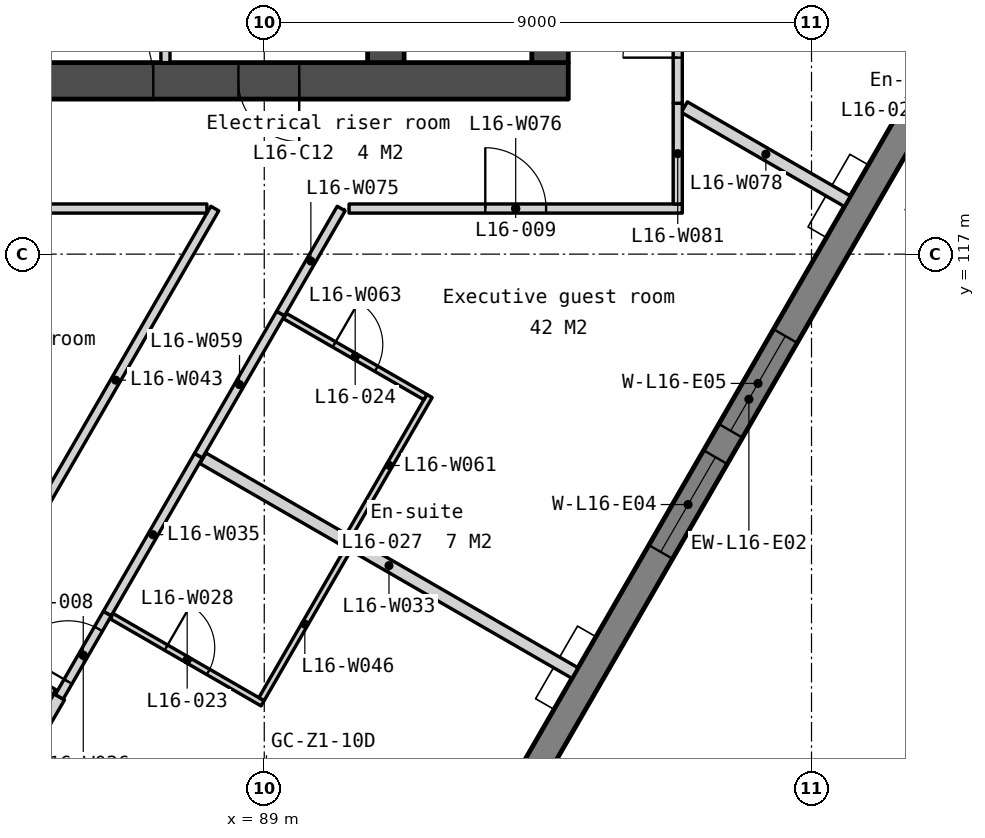
"""IFC4 building model, lengths in metres.
Left out: names, types, materials, properties, quantities, classifications, styles, units other than length and angle.
Written with IfcOpenShell. Run it as: python <this file> out.ifc"""

import sys

from ifc_helpers import new_model, si_unit, direction, frame, frame_2d, origin, place, context, subcontext, project, spatial, polyline, rectangle, outline, extrude, element, fill, save


model = new_model("IFC4")
c1 = context("Model", 3, precision=1e-05, world=origin(), true_north=direction((0.0, 1.0)))
c2 = subcontext(c1, "Body", "Model", "MODEL_VIEW")
j1 = project(units=[si_unit("LENGTHUNIT", "METRE"), si_unit("PLANEANGLEUNIT", "RADIAN")], contexts=[c1])
p1 = place(None, origin())
s1 = spatial("IfcSite", under=j1, at=p1, CompositionType="ELEMENT")
p2 = place(p1, origin())
s2 = spatial("IfcBuilding", under=s1, at=p2, CompositionType="ELEMENT")
p3 = place(p2, frame((0.0, 0.0, 70.0)))
s3 = spatial("IfcBuildingStorey", under=s2, at=p3, CompositionType="ELEMENT", Elevation=70.0)
p4 = place(p3, frame((66.0, 119.85, 0.0), z_axis=(0.0, 0.0, 1.0), x_axis=(1.0, 0.0, 0.0)))
e1 = element("IfcWall", 1, at=p4, inside=s3, PredefinedType="SOLIDWALL", context=c2, shape_type="SweptSolid", body=[
    extrude(rectangle(XDim=28.0, YDim=0.6, at=frame_2d((14.0, 0.0))), origin(), (0.0, 0.0, 1.0), 3.35),
])
p5 = place(p4, frame((6.825, 0.0, 0.0)))
e2 = element("IfcOpeningElement", 2, at=p5, cuts=e1, PredefinedType="OPENING", context=c2, shape_type="SweptSolid", body=[
    extrude(rectangle(XDim=1.8, YDim=2.1, at=frame_2d((0.9, 1.05))), frame((0.0, 0.31, 0.0), z_axis=(0.0, -1.0, 0.0), x_axis=(1.0, 0.0, 0.0)), (0.0, 0.0, 1.0), 0.62),
])
p6 = place(p4, frame((15.85, 0.0, 0.0)))
e3 = element("IfcOpeningElement", 3, at=p6, cuts=e1, PredefinedType="OPENING", context=c2, shape_type="SweptSolid", body=[
    extrude(rectangle(XDim=1.5, YDim=2.1, at=frame_2d((0.75, 1.05))), frame((0.0, 0.31, 0.0), z_axis=(0.0, -1.0, 0.0), x_axis=(1.0, 0.0, 0.0)), (0.0, 0.0, 1.0), 0.62),
])
p7 = place(p4, frame((19.375, 0.0, 0.0)))
e4 = element("IfcOpeningElement", 4, at=p7, cuts=e1, PredefinedType="OPENING", context=c2, shape_type="SweptSolid", body=[
    extrude(rectangle(XDim=1.8, YDim=2.1, at=frame_2d((0.9, 1.05))), frame((0.0, 0.31, 0.0), z_axis=(0.0, -1.0, 0.0), x_axis=(1.0, 0.0, 0.0)), (0.0, 0.0, 1.0), 0.62),
])
p8 = place(p4, frame((4.425, 0.0, 0.0)))
e5 = element("IfcOpeningElement", 5, at=p8, cuts=e1, PredefinedType="OPENING", context=c2, shape_type="SweptSolid", body=[
    extrude(rectangle(XDim=1.0, YDim=2.1, at=frame_2d((0.5, 1.05))), frame((0.0, 0.31, 0.0), z_axis=(0.0, -1.0, 0.0), x_axis=(1.0, 0.0, 0.0)), (0.0, 0.0, 1.0), 0.62),
])
p9 = place(p4, frame((9.783, 0.0, 0.0)))
e6 = element("IfcOpeningElement", 6, at=p9, cuts=e1, PredefinedType="OPENING", context=c2, shape_type="SweptSolid", body=[
    extrude(rectangle(XDim=1.0, YDim=2.1, at=frame_2d((0.5, 1.05))), frame((0.0, 0.31, 0.0), z_axis=(0.0, -1.0, 0.0), x_axis=(1.0, 0.0, 0.0)), (0.0, 0.0, 1.0), 0.62),
])
p10 = place(p4, frame((11.525, 0.0, 0.0)))
e7 = element("IfcOpeningElement", 7, at=p10, cuts=e1, PredefinedType="OPENING", context=c2, shape_type="SweptSolid", body=[
    extrude(rectangle(XDim=1.0, YDim=2.1, at=frame_2d((0.5, 1.05))), frame((0.0, 0.31, 0.0), z_axis=(0.0, -1.0, 0.0), x_axis=(1.0, 0.0, 0.0)), (0.0, 0.0, 1.0), 0.62),
])
p11 = place(p4, frame((13.658, 0.0, 0.0)))
e8 = element("IfcOpeningElement", 8, at=p11, cuts=e1, PredefinedType="OPENING", context=c2, shape_type="SweptSolid", body=[
    extrude(rectangle(XDim=1.0, YDim=2.1, at=frame_2d((0.5, 1.05))), frame((0.0, 0.31, 0.0), z_axis=(0.0, -1.0, 0.0), x_axis=(1.0, 0.0, 0.0)), (0.0, 0.0, 1.0), 0.62),
])
p12 = place(p4, frame((22.575, 0.0, 0.0)))
e9 = element("IfcOpeningElement", 9, at=p12, cuts=e1, PredefinedType="OPENING", context=c2, shape_type="SweptSolid", body=[
    extrude(rectangle(XDim=1.0, YDim=2.1, at=frame_2d((0.5, 1.05))), frame((0.0, 0.31, 0.0), z_axis=(0.0, -1.0, 0.0), x_axis=(1.0, 0.0, 0.0)), (0.0, 0.0, 1.0), 0.62),
])
p13 = place(p3, frame((87.375, 122.25, 0.0), z_axis=(0.0, 0.0, 1.0), x_axis=(0.0, -1.0, 0.0)))
e10 = element("IfcWall", 10, at=p13, inside=s3, PredefinedType="PARTITIONING", context=c2, shape_type="SweptSolid", body=[
    extrude(rectangle(XDim=2.1, YDim=0.15, at=frame_2d((1.05, 0.0))), origin(), (0.0, 0.0, 1.0), 3.35),
])
p14 = place(p3, frame((91.0, 122.25, 0.0), z_axis=(0.0, 0.0, 1.0), x_axis=(0.0, -1.0, 0.0)))
e11 = element("IfcWall", 11, at=p14, inside=s3, PredefinedType="SOLIDWALL", context=c2, shape_type="SweptSolid", body=[
    extrude(rectangle(XDim=2.1, YDim=0.6, at=frame_2d((1.05, 0.0))), origin(), (0.0, 0.0, 1.0), 3.35),
])
p15 = place(p3, frame((93.7, 133.95, 0.0), z_axis=(0.0, 0.0, 1.0), x_axis=(0.0, -1.0, 0.0)))
e12 = element("IfcWall", 12, at=p15, inside=s3, PredefinedType="SOLIDWALL", context=c2, shape_type="SweptSolid", body=[
    extrude(rectangle(XDim=13.8, YDim=0.6, at=frame_2d((6.9, 0.0))), origin(), (0.0, 0.0, 1.0), 3.35),
])
p16 = place(p15, frame((0.6, 0.0, 0.0)))
e13 = element("IfcOpeningElement", 13, at=p16, cuts=e12, PredefinedType="OPENING", context=c2, shape_type="SweptSolid", body=[
    extrude(rectangle(XDim=1.1, YDim=2.1, at=frame_2d((0.55, 1.05))), frame((0.0, 0.31, 0.0), z_axis=(0.0, -1.0, 0.0), x_axis=(1.0, 0.0, 0.0)), (0.0, 0.0, 1.0), 0.62),
])
p17 = place(p15, frame((8.35, 0.0, 0.0)))
e14 = element("IfcOpeningElement", 14, at=p17, cuts=e12, PredefinedType="OPENING", context=c2, shape_type="SweptSolid", body=[
    extrude(rectangle(XDim=0.826, YDim=2.1, at=frame_2d((0.413, 1.05))), frame((0.0, 0.31, 0.0), z_axis=(0.0, -1.0, 0.0), x_axis=(1.0, 0.0, 0.0)), (0.0, 0.0, 1.0), 0.62),
])
p18 = place(p15, frame((10.071, 0.0, 0.0)))
e15 = element("IfcOpeningElement", 15, at=p18, cuts=e12, PredefinedType="OPENING", context=c2, shape_type="SweptSolid", body=[
    extrude(rectangle(XDim=1.0, YDim=2.1, at=frame_2d((0.5, 1.05))), frame((0.0, 0.31, 0.0), z_axis=(0.0, -1.0, 0.0), x_axis=(1.0, 0.0, 0.0)), (0.0, 0.0, 1.0), 0.62),
])
p19 = place(p15, frame((12.258, 0.0, 0.0)))
e16 = element("IfcOpeningElement", 16, at=p19, cuts=e12, PredefinedType="OPENING", context=c2, shape_type="SweptSolid", body=[
    extrude(rectangle(XDim=1.0, YDim=2.1, at=frame_2d((0.5, 1.05))), frame((0.0, 0.31, 0.0), z_axis=(0.0, -1.0, 0.0), x_axis=(1.0, 0.0, 0.0)), (0.0, 0.0, 1.0), 0.62),
])
p20 = place(p3, frame((88.435, 99.831, -0.15), z_axis=(0.0, 0.0, 1.0), x_axis=(0.500000806382, 0.866024938219, 0.0)))
e17 = element("IfcWall", 17, at=p20, inside=s3, PredefinedType="SOLIDWALL", context=c2, shape_type="SweptSolid", body=[
    extrude(outline(polyline([(34.14, 3.5), (34.14, 0.0), (0.0, 0.0), (0.0, 3.5), (34.14, 3.5)])), frame((0.0, 0.225, 0.0), z_axis=(0.0, -1.0, 0.0), x_axis=(1.0, 0.0, 0.0)), (0.0, 0.0, 1.0), 0.45),
])
p21 = place(p20, frame((5.21, 0.0, 1.05)))
e18 = element("IfcOpeningElement", 18, at=p21, cuts=e17, PredefinedType="OPENING", context=c2, shape_type="SweptSolid", body=[
    extrude(rectangle(XDim=1.8, YDim=1.5, at=frame_2d((0.9, 0.75))), frame((0.0, 0.235, 0.0), z_axis=(0.0, -1.0, 0.0), x_axis=(1.0, 0.0, 0.0)), (0.0, 0.0, 1.0), 0.47),
])
p22 = place(p20, frame((7.51, 0.0, 1.05)))
e19 = element("IfcOpeningElement", 19, at=p22, cuts=e17, PredefinedType="OPENING", context=c2, shape_type="SweptSolid", body=[
    extrude(rectangle(XDim=1.8, YDim=1.5, at=frame_2d((0.9, 0.75))), frame((0.0, 0.235, 0.0), z_axis=(0.0, -1.0, 0.0), x_axis=(1.0, 0.0, 0.0)), (0.0, 0.0, 1.0), 0.47),
])
p23 = place(p20, frame((14.17, 0.0, 1.05)))
e20 = element("IfcOpeningElement", 20, at=p23, cuts=e17, PredefinedType="OPENING", context=c2, shape_type="SweptSolid", body=[
    extrude(rectangle(XDim=1.8, YDim=1.5, at=frame_2d((0.9, 0.75))), frame((0.0, 0.235, 0.0), z_axis=(0.0, -1.0, 0.0), x_axis=(1.0, 0.0, 0.0)), (0.0, 0.0, 1.0), 0.47),
])
p24 = place(p20, frame((16.47, 0.0, 1.05)))
e21 = element("IfcOpeningElement", 21, at=p24, cuts=e17, PredefinedType="OPENING", context=c2, shape_type="SweptSolid", body=[
    extrude(rectangle(XDim=1.8, YDim=1.5, at=frame_2d((0.9, 0.75))), frame((0.0, 0.235, 0.0), z_axis=(0.0, -1.0, 0.0), x_axis=(1.0, 0.0, 0.0)), (0.0, 0.0, 1.0), 0.47),
])
p25 = place(p20, frame((23.13, 0.0, 1.05)))
e22 = element("IfcOpeningElement", 22, at=p25, cuts=e17, PredefinedType="OPENING", context=c2, shape_type="SweptSolid", body=[
    extrude(rectangle(XDim=1.8, YDim=1.5, at=frame_2d((0.9, 0.75))), frame((0.0, 0.235, 0.0), z_axis=(0.0, -1.0, 0.0), x_axis=(1.0, 0.0, 0.0)), (0.0, 0.0, 1.0), 0.47),
])
p26 = place(p20, frame((25.43, 0.0, 1.05)))
e23 = element("IfcOpeningElement", 23, at=p26, cuts=e17, PredefinedType="OPENING", context=c2, shape_type="SweptSolid", body=[
    extrude(rectangle(XDim=1.8, YDim=1.5, at=frame_2d((0.9, 0.75))), frame((0.0, 0.235, 0.0), z_axis=(0.0, -1.0, 0.0), x_axis=(1.0, 0.0, 0.0)), (0.0, 0.0, 1.0), 0.47),
])
p27 = place(p20, frame((32.154, 0.0, 1.05)))
e24 = element("IfcOpeningElement", 24, at=p27, cuts=e17, PredefinedType="OPENING", context=c2, shape_type="SweptSolid", body=[
    extrude(rectangle(XDim=1.2, YDim=1.5, at=frame_2d((0.6, 0.75))), frame((0.0, 0.235, 0.0), z_axis=(0.0, -1.0, 0.0), x_axis=(1.0, 0.0, 0.0)), (0.0, 0.0, 1.0), 0.47),
])
p28 = place(p3, frame((80.087, 100.121, 0.0), z_axis=(0.0, 0.0, 1.0), x_axis=(0.500000851129, 0.866024912384, 0.0)))
e25 = element("IfcWall", 25, at=p28, inside=s3, PredefinedType="PARTITIONING", context=c2, shape_type="SweptSolid", body=[
    extrude(rectangle(XDim=11.083, YDim=0.2, at=frame_2d((5.542, 0.0))), origin(), (0.0, 0.0, 1.0), 3.35),
])
p29 = place(p3, frame((86.492, 111.045, 0.0), z_axis=(0.0, 0.0, 1.0), x_axis=(0.866047940603, -0.499960963054, 0.0)))
e26 = element("IfcWall", 26, at=p29, inside=s3, PredefinedType="PARTITIONING", context=c2, shape_type="SweptSolid", body=[
    extrude(rectangle(XDim=2.865, YDim=0.1, at=frame_2d((1.433, 0.0))), origin(), (0.0, 0.0, 1.0), 3.35),
])
p30 = place(p29, frame((1.032, 0.0, 0.0)))
e27 = element("IfcOpeningElement", 27, at=p30, cuts=e26, PredefinedType="OPENING", context=c2, shape_type="SweptSolid", body=[
    extrude(rectangle(XDim=0.8, YDim=2.1, at=frame_2d((0.4, 1.05))), frame((0.0, 0.06, 0.0), z_axis=(0.0, -1.0, 0.0), x_axis=(1.0, 0.0, 0.0)), (0.0, 0.0, 1.0), 0.12),
])
p31 = place(p3, frame((82.527, 111.498, 0.0), z_axis=(0.0, 0.0, 1.0), x_axis=(0.867448529518, -0.497526932575, 0.0)))
e28 = element("IfcWall", 28, at=p31, inside=s3, PredefinedType="PARTITIONING", context=c2, shape_type="SweptSolid", body=[
    extrude(rectangle(XDim=3.465, YDim=0.15, at=frame_2d((1.732, 0.0))), origin(), (0.0, 0.0, 1.0), 3.35),
])
p32 = place(p3, frame((87.992, 113.643, 0.0), z_axis=(0.0, 0.0, 1.0), x_axis=(0.866033669941, -0.499985682323, 0.0)))
e29 = element("IfcWall", 29, at=p32, inside=s3, PredefinedType="PARTITIONING", context=c2, shape_type="SweptSolid", body=[
    extrude(rectangle(XDim=7.065, YDim=0.2, at=frame_2d((3.533, 0.0))), origin(), (0.0, 0.0, 1.0), 3.35),
])
p33 = place(p3, frame((86.418, 111.087, 0.0), z_axis=(0.0, 0.0, 1.0), x_axis=(0.499990139034, 0.866031096941, 0.0)))
e30 = element("IfcWall", 30, at=p33, inside=s3, PredefinedType="PARTITIONING", context=c2, shape_type="SweptSolid", body=[
    extrude(rectangle(XDim=3.0, YDim=0.15, at=frame_2d((1.5, 0.0))), origin(), (0.0, 0.0, 1.0), 3.35),
])
p34 = place(p3, frame((85.628, 109.719, 0.0), z_axis=(0.0, 0.0, 1.0), x_axis=(0.499994407638, 0.866028632512, 0.0)))
e31 = element("IfcWall", 31, at=p34, inside=s3, PredefinedType="PARTITIONING", context=c2, shape_type="SweptSolid", body=[
    extrude(rectangle(XDim=1.58, YDim=0.15, at=frame_2d((0.79, 0.0))), origin(), (0.0, 0.0, 1.0), 3.35),
])
p35 = place(p34, frame((0.29, 0.0, 0.0)))
e32 = element("IfcOpeningElement", 32, at=p35, cuts=e31, PredefinedType="OPENING", context=c2, shape_type="SweptSolid", body=[
    extrude(rectangle(XDim=1.0, YDim=2.1, at=frame_2d((0.5, 1.05))), frame((0.0, 0.085, 0.0), z_axis=(0.0, -1.0, 0.0), x_axis=(1.0, 0.0, 0.0)), (0.0, 0.0, 1.0), 0.17),
])
p36 = place(p3, frame((84.927, 112.104, 0.0), z_axis=(0.0, 0.0, 1.0), x_axis=(0.50000555188, 0.866022198381, 0.0)))
e33 = element("IfcWall", 33, at=p36, inside=s3, PredefinedType="PARTITIONING", context=c2, shape_type="SweptSolid", body=[
    extrude(rectangle(XDim=6.52, YDim=0.15, at=frame_2d((3.26, 0.0))), origin(), (0.0, 0.0, 1.0), 3.35),
])
p37 = place(p3, frame((88.955, 109.68, 0.0), z_axis=(0.0, 0.0, 1.0), x_axis=(0.499999279071, 0.866025820012, 0.0)))
e34 = element("IfcWall", 34, at=p37, inside=s3, PredefinedType="PARTITIONING", context=c2, shape_type="SweptSolid", body=[
    extrude(rectangle(XDim=2.85, YDim=0.1, at=frame_2d((1.425, 0.0))), origin(), (0.0, 0.0, 1.0), 3.35),
])
p38 = place(p3, frame((87.918, 113.685, 0.0), z_axis=(0.0, 0.0, 1.0), x_axis=(0.500048589285, 0.86599734893, 0.0)))
e35 = element("IfcWall", 35, at=p38, inside=s3, PredefinedType="PARTITIONING", context=c2, shape_type="SweptSolid", body=[
    extrude(rectangle(XDim=2.7, YDim=0.15, at=frame_2d((1.35, 0.0))), origin(), (0.0, 0.0, 1.0), 3.35),
])
p39 = place(p3, frame((90.398, 112.381, 0.0), z_axis=(0.0, 0.0, 1.0), x_axis=(0.499978641112, 0.866037734993, 0.0)))
e36 = element("IfcWall", 36, at=p39, inside=s3, PredefinedType="PARTITIONING", context=c2, shape_type="SweptSolid", body=[
    extrude(rectangle(XDim=2.64, YDim=0.1, at=frame_2d((1.32, 0.0))), origin(), (0.0, 0.0, 1.0), 3.35),
])
p40 = place(p3, frame((89.342, 115.981, 0.0), z_axis=(0.0, 0.0, 1.0), x_axis=(0.86601318911, -0.500021155841, 0.0)))
e37 = element("IfcWall", 37, at=p40, inside=s3, PredefinedType="PARTITIONING", context=c2, shape_type="SweptSolid", body=[
    extrude(rectangle(XDim=2.665, YDim=0.1, at=frame_2d((1.333, 0.0))), origin(), (0.0, 0.0, 1.0), 3.35),
])
p41 = place(p40, frame((0.933, 0.0, 0.0)))
e38 = element("IfcOpeningElement", 38, at=p41, cuts=e37, PredefinedType="OPENING", context=c2, shape_type="SweptSolid", body=[
    extrude(rectangle(XDim=0.8, YDim=2.1, at=frame_2d((0.4, 1.05))), frame((0.0, 0.06, 0.0), z_axis=(0.0, -1.0, 0.0), x_axis=(1.0, 0.0, 0.0)), (0.0, 0.0, 1.0), 0.12),
])
p42 = place(p3, frame((80.89, 117.75, 0.0), z_axis=(0.0, 0.0, 1.0), x_axis=(1.0, 0.0, 0.0)))
e39 = element("IfcWall", 39, at=p42, inside=s3, PredefinedType="PARTITIONING", context=c2, shape_type="SweptSolid", body=[
    extrude(rectangle(XDim=7.167, YDim=0.15, at=frame_2d((3.583, 0.0))), origin(), (0.0, 0.0, 1.0), 3.35),
])
p43 = place(p42, frame((3.133, 0.0, 0.0)))
e40 = element("IfcOpeningElement", 40, at=p43, cuts=e39, PredefinedType="OPENING", context=c2, shape_type="SweptSolid", body=[
    extrude(rectangle(XDim=0.9, YDim=2.1, at=frame_2d((0.45, 1.05))), frame((0.0, 0.085, 0.0), z_axis=(0.0, -1.0, 0.0), x_axis=(1.0, 0.0, 0.0)), (0.0, 0.0, 1.0), 0.17),
])
p44 = place(p3, frame((89.268, 116.023, 0.0), z_axis=(0.0, 0.0, 1.0), x_axis=(0.499906209203, 0.866079547155, 0.0)))
e41 = element("IfcWall", 41, at=p44, inside=s3, PredefinedType="PARTITIONING", context=c2, shape_type="SweptSolid", body=[
    extrude(rectangle(XDim=1.994, YDim=0.15, at=frame_2d((0.997, 0.0))), origin(), (0.0, 0.0, 1.0), 3.35),
])
p45 = place(p3, frame((90.395, 117.75, 0.0), z_axis=(0.0, 0.0, 1.0), x_axis=(1.0, 0.0, 0.0)))
e42 = element("IfcWall", 42, at=p45, inside=s3, PredefinedType="PARTITIONING", context=c2, shape_type="SweptSolid", body=[
    extrude(rectangle(XDim=5.48, YDim=0.15, at=frame_2d((2.74, 0.0))), origin(), (0.0, 0.0, 1.0), 3.35),
])
p46 = place(p45, frame((2.24, 0.0, 0.0)))
e43 = element("IfcOpeningElement", 43, at=p46, cuts=e42, PredefinedType="OPENING", context=c2, shape_type="SweptSolid", body=[
    extrude(rectangle(XDim=1.0, YDim=2.1, at=frame_2d((0.5, 1.05))), frame((0.0, 0.085, 0.0), z_axis=(0.0, -1.0, 0.0), x_axis=(1.0, 0.0, 0.0)), (0.0, 0.0, 1.0), 0.17),
])
p47 = place(p3, frame((95.908, 119.418, 0.0), z_axis=(0.0, 0.0, 1.0), x_axis=(0.866051688794, -0.499954470265, 0.0)))
e44 = element("IfcWall", 44, at=p47, inside=s3, PredefinedType="PARTITIONING", context=c2, shape_type="SweptSolid", body=[
    extrude(rectangle(XDim=3.097, YDim=0.2, at=frame_2d((1.548, 0.0))), origin(), (0.0, 0.0, 1.0), 3.35),
])
p48 = place(p3, frame((95.8, 117.825, 0.0), z_axis=(0.0, 0.0, 1.0), x_axis=(0.0, 1.0, 0.0)))
e45 = element("IfcWall", 45, at=p48, inside=s3, PredefinedType="PARTITIONING", context=c2, shape_type="SweptSolid", body=[
    extrude(rectangle(XDim=1.656, YDim=0.15, at=frame_2d((0.828, 0.0))), origin(), (0.0, 0.0, 1.0), 3.35),
])
p49 = place(p3, frame((95.8, 119.481, 0.0), z_axis=(0.0, 0.0, 1.0), x_axis=(0.0, 1.0, 0.0)))
e46 = element("IfcWall", 46, at=p49, inside=s3, PredefinedType="PARTITIONING", context=c2, shape_type="SweptSolid", body=[
    extrude(rectangle(XDim=2.402, YDim=0.15, at=frame_2d((1.201, 0.0))), origin(), (0.0, 0.0, 1.0), 3.35),
])
p50 = place(p49, frame((0.751, 0.0, 0.0)))
e47 = element("IfcOpeningElement", 47, at=p50, cuts=e46, PredefinedType="OPENING", context=c2, shape_type="SweptSolid", body=[
    extrude(rectangle(XDim=0.9, YDim=2.1, at=frame_2d((0.45, 1.05))), frame((0.0, 0.085, 0.0), z_axis=(0.0, -1.0, 0.0), x_axis=(1.0, 0.0, 0.0)), (0.0, 0.0, 1.0), 0.17),
])
p51 = place(p7, origin())
e48 = element("IfcDoor", 48, at=p51, inside=s3, OperationType="DOUBLE_DOOR_DOUBLE_SWING", PredefinedType="DOOR", context=c2, shape_type="SweptSolid", body=[
    extrude(rectangle(XDim=1.8, YDim=2.1, at=frame_2d((0.9, 1.05))), frame((0.0, 0.025, 0.0), z_axis=(0.0, -1.0, 0.0), x_axis=(1.0, 0.0, 0.0)), (0.0, 0.0, 1.0), 0.05),
])
fill(e4, e48)
p52 = place(p12, origin())
e49 = element("IfcDoor", 49, at=p52, inside=s3, OperationType="SINGLE_SWING_RIGHT", PredefinedType="DOOR", context=c2, shape_type="SweptSolid", body=[
    extrude(rectangle(XDim=1.0, YDim=2.1, at=frame_2d((0.5, 1.05))), frame((0.0, 0.025, 0.0), z_axis=(0.0, -1.0, 0.0), x_axis=(1.0, 0.0, 0.0)), (0.0, 0.0, 1.0), 0.05),
])
fill(e9, e49)
p53 = place(p23, origin())
e50 = element("IfcWindow", 50, at=p53, inside=s3, PartitioningType="SINGLE_PANEL", PredefinedType="WINDOW", context=c2, shape_type="SweptSolid", body=[
    extrude(rectangle(XDim=1.8, YDim=1.5, at=frame_2d((0.9, 0.75))), frame((0.0, 0.03, 0.0), z_axis=(0.0, -1.0, 0.0), x_axis=(1.0, 0.0, 0.0)), (0.0, 0.0, 1.0), 0.06),
])
fill(e20, e50)
p54 = place(p24, origin())
e51 = element("IfcWindow", 51, at=p54, inside=s3, PartitioningType="SINGLE_PANEL", PredefinedType="WINDOW", context=c2, shape_type="SweptSolid", body=[
    extrude(rectangle(XDim=1.8, YDim=1.5, at=frame_2d((0.9, 0.75))), frame((0.0, 0.03, 0.0), z_axis=(0.0, -1.0, 0.0), x_axis=(1.0, 0.0, 0.0)), (0.0, 0.0, 1.0), 0.06),
])
fill(e21, e51)
p55 = place(p35, origin())
e52 = element("IfcDoor", 52, at=p55, inside=s3, OperationType="SINGLE_SWING_LEFT", PredefinedType="DOOR", context=c2, shape_type="SweptSolid", body=[
    extrude(rectangle(XDim=1.0, YDim=2.1, at=frame_2d((0.5, 1.05))), frame((0.0, 0.025, 0.0), z_axis=(0.0, -1.0, 0.0), x_axis=(1.0, 0.0, 0.0)), (0.0, 0.0, 1.0), 0.05),
])
fill(e32, e52)
p56 = place(p46, origin())
e53 = element("IfcDoor", 53, at=p56, inside=s3, OperationType="SINGLE_SWING_LEFT", PredefinedType="DOOR", context=c2, shape_type="SweptSolid", body=[
    extrude(rectangle(XDim=1.0, YDim=2.1, at=frame_2d((0.5, 1.05))), frame((0.0, 0.025, 0.0), z_axis=(0.0, -1.0, 0.0), x_axis=(1.0, 0.0, 0.0)), (0.0, 0.0, 1.0), 0.05),
])
fill(e43, e53)
p57 = place(p50, origin())
e54 = element("IfcDoor", 54, at=p57, inside=s3, OperationType="SINGLE_SWING_LEFT", PredefinedType="DOOR", context=c2, shape_type="SweptSolid", body=[
    extrude(rectangle(XDim=0.9, YDim=2.1, at=frame_2d((0.45, 1.05))), frame((0.0, 0.025, 0.0), z_axis=(0.0, -1.0, 0.0), x_axis=(1.0, 0.0, 0.0)), (0.0, 0.0, 1.0), 0.05),
])
fill(e47, e54)
p58 = place(p30, origin())
e55 = element("IfcDoor", 55, at=p58, inside=s3, OperationType="SINGLE_SWING_LEFT", PredefinedType="DOOR", context=c2, shape_type="SweptSolid", body=[
    extrude(rectangle(XDim=0.8, YDim=2.1, at=frame_2d((0.4, 1.05))), frame((0.0, 0.025, 0.0), z_axis=(0.0, -1.0, 0.0), x_axis=(1.0, 0.0, 0.0)), (0.0, 0.0, 1.0), 0.05),
])
fill(e27, e55)
p59 = place(p41, origin())
e56 = element("IfcDoor", 56, at=p59, inside=s3, OperationType="SINGLE_SWING_LEFT", PredefinedType="DOOR", context=c2, shape_type="SweptSolid", body=[
    extrude(rectangle(XDim=0.8, YDim=2.1, at=frame_2d((0.4, 1.05))), frame((0.0, 0.025, 0.0), z_axis=(0.0, -1.0, 0.0), x_axis=(1.0, 0.0, 0.0)), (0.0, 0.0, 1.0), 0.05),
])
fill(e38, e56)
save(model, sys.argv[1])
